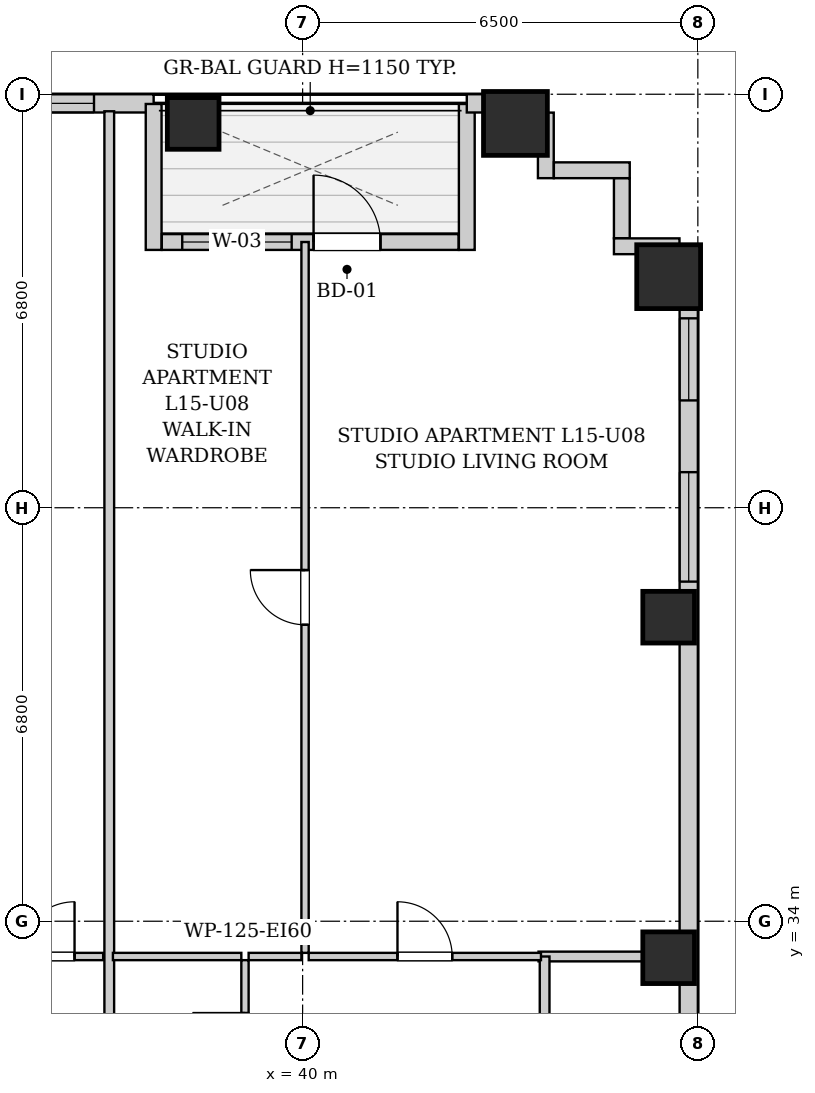
"""IFC4 building model, lengths in metres.
Left out: names, types, materials, properties, quantities, classifications, styles, units other than length and angle.
Written with IfcOpenShell. Run it as: python <this file> out.ifc"""

import sys

from ifc_helpers import new_model, si_unit, direction, frame, frame_2d, origin, origin_2d, place, context, subcontext, project, spatial, rectangle, extrude, element, fill, save


model = new_model("IFC4")
c1 = context("Model", 3, precision=1e-05, world=origin(), true_north=direction((0.0, 1.0)))
c2 = subcontext(c1, "Body", "Model", "MODEL_VIEW")
j1 = project(units=[si_unit("LENGTHUNIT", "METRE"), si_unit("PLANEANGLEUNIT", "RADIAN")], contexts=[c1])
p1 = place(None, origin())
s1 = spatial("IfcSite", under=j1, at=p1, CompositionType="ELEMENT")
p2 = place(p1, origin())
s2 = spatial("IfcBuilding", under=s1, at=p2, CompositionType="ELEMENT")
p3 = place(p2, frame((0.0, 0.0, 57.8)))
s3 = spatial("IfcBuildingStorey", under=s2, at=p3, CompositionType="ELEMENT", Elevation=57.8)
p4 = place(p3, frame((38.2, 47.12, 0.0), z_axis=(0.0, 0.0, 1.0), x_axis=(1.0, 0.0, 0.0)))
e1 = element("IfcColumn", 1, at=p4, inside=s3, PredefinedType="COLUMN", context=c2, shape_type="SweptSolid", body=[
    extrude(rectangle(XDim=0.85, YDim=0.85, at=origin_2d()), origin(), (0.0, 0.0, 1.0), 3.2),
])
p5 = place(p3, frame((43.5, 47.12, 0.0), z_axis=(0.0, 0.0, 1.0), x_axis=(1.0, 0.0, 0.0)))
e2 = element("IfcColumn", 2, at=p5, inside=s3, PredefinedType="COLUMN", context=c2, shape_type="SweptSolid", body=[
    extrude(rectangle(XDim=1.05, YDim=1.05, at=origin_2d()), origin(), (0.0, 0.0, 1.0), 3.2),
])
for number, where, z_axis, x_axis in (
    (3, (46.02, 33.4, 0.0), (0.0, 0.0, 1.0), (1.0, 0.0, 0.0)),
    (4, (46.02, 39.0, 0.0), (0.0, 0.0, 1.0), (1.0, 0.0, 0.0)),
):
    element("IfcColumn", number, at=place(p3, frame(where, z_axis=z_axis, x_axis=x_axis)), inside=s3, PredefinedType="COLUMN", context=c2, shape_type="SweptSolid", body=[
        extrude(rectangle(XDim=0.85, YDim=0.85, at=origin_2d()), origin(), (0.0, 0.0, 1.0), 3.2),
    ])
p6 = place(p3, frame((46.02, 44.6, 0.0), z_axis=(0.0, 0.0, 1.0), x_axis=(1.0, 0.0, 0.0)))
e5 = element("IfcColumn", 5, at=p6, inside=s3, PredefinedType="COLUMN", context=c2, shape_type="SweptSolid", body=[
    extrude(rectangle(XDim=1.05, YDim=1.05, at=origin_2d()), origin(), (0.0, 0.0, 1.0), 3.2),
])
p7 = place(p3, frame((10.0, 47.45, 0.0), z_axis=(0.0, 0.0, 1.0), x_axis=(1.0, 0.0, 0.0)))
e6 = element("IfcWall", 6, at=p7, inside=s3, PredefinedType="SOLIDWALL", context=c2, shape_type="SweptSolid", body=[
    extrude(rectangle(XDim=27.55, YDim=0.3, at=frame_2d((13.775, 0.0))), origin(), (0.0, 0.0, 1.0), 1.975),
])
p8 = place(p7, frame((1.735, 0.0, 0.55)))
e7 = element("IfcOpeningElement", 7, at=p8, cuts=e6, PredefinedType="OPENING", context=c2, shape_type="SweptSolid", body=[
    extrude(rectangle(XDim=1.8, YDim=1.2, at=frame_2d((0.9, 0.6))), frame((0.0, 0.16, 0.0), z_axis=(0.0, -1.0, 0.0), x_axis=(1.0, 0.0, 0.0)), (0.0, 0.0, 1.0), 0.32),
])
p9 = place(p7, frame((5.415, 0.0, 0.55)))
e8 = element("IfcOpeningElement", 8, at=p9, cuts=e6, PredefinedType="OPENING", context=c2, shape_type="SweptSolid", body=[
    extrude(rectangle(XDim=1.8, YDim=1.2, at=frame_2d((0.9, 0.6))), frame((0.0, 0.16, 0.0), z_axis=(0.0, -1.0, 0.0), x_axis=(1.0, 0.0, 0.0)), (0.0, 0.0, 1.0), 0.32),
])
p10 = place(p7, frame((10.617, 0.0, 0.55)))
e9 = element("IfcOpeningElement", 9, at=p10, cuts=e6, PredefinedType="OPENING", context=c2, shape_type="SweptSolid", body=[
    extrude(rectangle(XDim=1.8, YDim=1.2, at=frame_2d((0.9, 0.6))), frame((0.0, 0.16, 0.0), z_axis=(0.0, -1.0, 0.0), x_axis=(1.0, 0.0, 0.0)), (0.0, 0.0, 1.0), 0.32),
])
p11 = place(p7, frame((17.5, 0.0, 0.55)))
e10 = element("IfcOpeningElement", 10, at=p11, cuts=e6, PredefinedType="OPENING", context=c2, shape_type="SweptSolid", body=[
    extrude(rectangle(XDim=0.85, YDim=1.2, at=frame_2d((0.425, 0.6))), frame((0.0, 0.16, 0.0), z_axis=(0.0, -1.0, 0.0), x_axis=(1.0, 0.0, 0.0)), (0.0, 0.0, 1.0), 0.32),
])
p12 = place(p7, frame((19.349, 0.0, 0.55)))
e11 = element("IfcOpeningElement", 11, at=p12, cuts=e6, PredefinedType="OPENING", context=c2, shape_type="SweptSolid", body=[
    extrude(rectangle(XDim=1.8, YDim=1.2, at=frame_2d((0.9, 0.6))), frame((0.0, 0.16, 0.0), z_axis=(0.0, -1.0, 0.0), x_axis=(1.0, 0.0, 0.0)), (0.0, 0.0, 1.0), 0.32),
])
p13 = place(p7, frame((24.769, 0.0, 0.55)))
e12 = element("IfcOpeningElement", 12, at=p13, cuts=e6, PredefinedType="OPENING", context=c2, shape_type="SweptSolid", body=[
    extrude(rectangle(XDim=1.8, YDim=1.2, at=frame_2d((0.9, 0.6))), frame((0.0, 0.16, 0.0), z_axis=(0.0, -1.0, 0.0), x_axis=(1.0, 0.0, 0.0)), (0.0, 0.0, 1.0), 0.32),
])
p14 = place(p3, frame((37.55, 47.44, 0.0), z_axis=(0.0, 0.0, 1.0), x_axis=(0.0, -1.0, 0.0)))
e13 = element("IfcWall", 13, at=p14, inside=s3, PredefinedType="SOLIDWALL", context=c2, shape_type="SweptSolid", body=[
    extrude(rectangle(XDim=2.4, YDim=0.26, at=frame_2d((1.2, 0.0))), origin(), (0.0, 0.0, 1.0), 2.94),
])
p15 = place(p3, frame((37.684, 45.17, 0.0), z_axis=(0.0, 0.0, 1.0), x_axis=(1.0, 0.0, 0.0)))
e14 = element("IfcWall", 14, at=p15, inside=s3, PredefinedType="SOLIDWALL", context=c2, shape_type="SweptSolid", body=[
    extrude(rectangle(XDim=4.882, YDim=0.26, at=frame_2d((2.441, 0.0))), origin(), (0.0, 0.0, 1.0), 2.94),
])
p16 = place(p15, frame((2.496, 0.0, 0.0)))
e15 = element("IfcOpeningElement", 15, at=p16, cuts=e14, PredefinedType="OPENING", context=c2, shape_type="SweptSolid", body=[
    extrude(rectangle(XDim=1.1, YDim=2.0, at=frame_2d((0.55, 1.0))), frame((0.0, 0.14, 0.0), z_axis=(0.0, -1.0, 0.0), x_axis=(1.0, 0.0, 0.0)), (0.0, 0.0, 1.0), 0.28),
])
p17 = place(p15, frame((0.336, 0.0, 0.85)))
e16 = element("IfcOpeningElement", 16, at=p17, cuts=e14, PredefinedType="OPENING", context=c2, shape_type="SweptSolid", body=[
    extrude(rectangle(XDim=1.8, YDim=1.65, at=frame_2d((0.9, 0.825))), frame((0.0, 0.14, 0.0), z_axis=(0.0, -1.0, 0.0), x_axis=(1.0, 0.0, 0.0)), (0.0, 0.0, 1.0), 0.28),
])
p18 = place(p3, frame((42.7, 45.04, 0.0), z_axis=(0.0, 0.0, 1.0), x_axis=(0.0, 1.0, 0.0)))
e17 = element("IfcWall", 17, at=p18, inside=s3, PredefinedType="SOLIDWALL", context=c2, shape_type="SweptSolid", body=[
    extrude(rectangle(XDim=2.4, YDim=0.26, at=frame_2d((1.2, 0.0))), origin(), (0.0, 0.0, 1.0), 2.94),
])
p19 = place(p3, frame((42.7, 47.45, 0.0), z_axis=(0.0, 0.0, 1.0), x_axis=(1.0, 0.0, 0.0)))
e18 = element("IfcWall", 18, at=p19, inside=s3, PredefinedType="SOLIDWALL", context=c2, shape_type="SweptSolid", body=[
    extrude(rectangle(XDim=1.3, YDim=0.3, at=frame_2d((0.65, 0.0))), origin(), (0.0, 0.0, 1.0), 1.975),
])
p20 = place(p3, frame((46.35, 45.1, 0.0), z_axis=(0.0, 0.0, 1.0), x_axis=(0.0, -1.0, 0.0)))
e19 = element("IfcWall", 19, at=p20, inside=s3, PredefinedType="SOLIDWALL", context=c2, shape_type="SweptSolid", body=[
    extrude(rectangle(XDim=42.6, YDim=0.3, at=frame_2d((21.3, 0.0))), origin(), (0.0, 0.0, 1.0), 1.975),
])
p21 = place(p20, frame((37.575, 0.0, 0.55)))
e20 = element("IfcOpeningElement", 20, at=p21, cuts=e19, PredefinedType="OPENING", context=c2, shape_type="SweptSolid", body=[
    extrude(rectangle(XDim=1.8, YDim=1.2, at=frame_2d((0.9, 0.6))), frame((0.0, 0.16, 0.0), z_axis=(0.0, -1.0, 0.0), x_axis=(1.0, 0.0, 0.0)), (0.0, 0.0, 1.0), 0.32),
])
p22 = place(p20, frame((34.85, 0.0, 0.55)))
e21 = element("IfcOpeningElement", 21, at=p22, cuts=e19, PredefinedType="OPENING", context=c2, shape_type="SweptSolid", body=[
    extrude(rectangle(XDim=1.35, YDim=1.2, at=frame_2d((0.675, 0.6))), frame((0.0, 0.16, 0.0), z_axis=(0.0, -1.0, 0.0), x_axis=(1.0, 0.0, 0.0)), (0.0, 0.0, 1.0), 0.32),
])
p23 = place(p20, frame((3.715, 0.0, 0.55)))
e22 = element("IfcOpeningElement", 22, at=p23, cuts=e19, PredefinedType="OPENING", context=c2, shape_type="SweptSolid", body=[
    extrude(rectangle(XDim=1.8, YDim=1.2, at=frame_2d((0.9, 0.6))), frame((0.0, 0.16, 0.0), z_axis=(0.0, -1.0, 0.0), x_axis=(1.0, 0.0, 0.0)), (0.0, 0.0, 1.0), 0.32),
])
p24 = place(p20, frame((1.185, 0.0, 0.55)))
e23 = element("IfcOpeningElement", 23, at=p24, cuts=e19, PredefinedType="OPENING", context=c2, shape_type="SweptSolid", body=[
    extrude(rectangle(XDim=1.35, YDim=1.2, at=frame_2d((0.675, 0.6))), frame((0.0, 0.16, 0.0), z_axis=(0.0, -1.0, 0.0), x_axis=(1.0, 0.0, 0.0)), (0.0, 0.0, 1.0), 0.32),
])
p25 = place(p20, frame((26.025, 0.0, 0.55)))
e24 = element("IfcOpeningElement", 24, at=p25, cuts=e19, PredefinedType="OPENING", context=c2, shape_type="SweptSolid", body=[
    extrude(rectangle(XDim=1.8, YDim=1.2, at=frame_2d((0.9, 0.6))), frame((0.0, 0.16, 0.0), z_axis=(0.0, -1.0, 0.0), x_axis=(1.0, 0.0, 0.0)), (0.0, 0.0, 1.0), 0.32),
])
p26 = place(p20, frame((28.085, 0.0, 0.55)))
e25 = element("IfcOpeningElement", 25, at=p26, cuts=e19, PredefinedType="OPENING", context=c2, shape_type="SweptSolid", body=[
    extrude(rectangle(XDim=1.35, YDim=1.2, at=frame_2d((0.675, 0.6))), frame((0.0, 0.16, 0.0), z_axis=(0.0, -1.0, 0.0), x_axis=(1.0, 0.0, 0.0)), (0.0, 0.0, 1.0), 0.32),
])
p27 = place(p20, frame((18.8, 0.0, 0.55)))
e26 = element("IfcOpeningElement", 26, at=p27, cuts=e19, PredefinedType="OPENING", context=c2, shape_type="SweptSolid", body=[
    extrude(rectangle(XDim=1.8, YDim=1.2, at=frame_2d((0.9, 0.6))), frame((0.0, 0.16, 0.0), z_axis=(0.0, -1.0, 0.0), x_axis=(1.0, 0.0, 0.0)), (0.0, 0.0, 1.0), 0.32),
])
p28 = place(p20, frame((16.685, 0.0, 0.55)))
e27 = element("IfcOpeningElement", 27, at=p28, cuts=e19, PredefinedType="OPENING", context=c2, shape_type="SweptSolid", body=[
    extrude(rectangle(XDim=1.35, YDim=1.2, at=frame_2d((0.675, 0.6))), frame((0.0, 0.16, 0.0), z_axis=(0.0, -1.0, 0.0), x_axis=(1.0, 0.0, 0.0)), (0.0, 0.0, 1.0), 0.32),
])
p29 = place(p3, frame((44.0, 47.298, 0.0), z_axis=(0.0, 0.0, 1.0), x_axis=(0.0, -1.0, 0.0)))
e28 = element("IfcWall", 28, at=p29, inside=s3, PredefinedType="SOLIDWALL", context=c2, shape_type="SweptSolid", body=[
    extrude(rectangle(XDim=1.078, YDim=0.26, at=frame_2d((0.539, 0.0))), origin(), (0.0, 0.0, 1.0), 2.94),
])
p30 = place(p3, frame((44.132, 46.35, 0.0), z_axis=(0.0, 0.0, 1.0), x_axis=(1.0, 0.0, 0.0)))
e29 = element("IfcWall", 29, at=p30, inside=s3, PredefinedType="SOLIDWALL", context=c2, shape_type="SweptSolid", body=[
    extrude(rectangle(XDim=1.248, YDim=0.26, at=frame_2d((0.624, 0.0))), origin(), (0.0, 0.0, 1.0), 2.94),
])
p31 = place(p3, frame((45.25, 46.218, 0.0), z_axis=(0.0, 0.0, 1.0), x_axis=(0.0, -1.0, 0.0)))
e30 = element("IfcWall", 30, at=p31, inside=s3, PredefinedType="SOLIDWALL", context=c2, shape_type="SweptSolid", body=[
    extrude(rectangle(XDim=0.986, YDim=0.26, at=frame_2d((0.493, 0.0))), origin(), (0.0, 0.0, 1.0), 2.94),
])
p32 = place(p3, frame((45.12, 45.1, 0.0), z_axis=(0.0, 0.0, 1.0), x_axis=(1.0, 0.0, 0.0)))
e31 = element("IfcWall", 31, at=p32, inside=s3, PredefinedType="SOLIDWALL", context=c2, shape_type="SweptSolid", body=[
    extrude(rectangle(XDim=1.078, YDim=0.26, at=frame_2d((0.539, 0.0))), origin(), (0.0, 0.0, 1.0), 2.94),
])
p33 = place(p3, frame((34.879, 33.42, 0.0), z_axis=(0.0, 0.0, 1.0), x_axis=(1.0, 0.0, 0.0)))
e32 = element("IfcWall", 32, at=p33, inside=s3, PredefinedType="PARTITIONING", context=c2, shape_type="SweptSolid", body=[
    extrude(rectangle(XDim=1.841, YDim=0.12, at=frame_2d((0.92, 0.0))), origin(), (0.0, 0.0, 1.0), 2.94),
])
p34 = place(p33, frame((0.47, 0.0, 0.0)))
e33 = element("IfcOpeningElement", 33, at=p34, cuts=e32, PredefinedType="OPENING", context=c2, shape_type="SweptSolid", body=[
    extrude(rectangle(XDim=0.9, YDim=2.05, at=frame_2d((0.45, 1.025))), frame((0.0, 0.07, 0.0), z_axis=(0.0, -1.0, 0.0), x_axis=(1.0, 0.0, 0.0)), (0.0, 0.0, 1.0), 0.14),
])
p35 = place(p3, frame((43.88, 33.42, 0.0), z_axis=(0.0, 0.0, 1.0), x_axis=(1.0, 0.0, 0.0)))
e34 = element("IfcWall", 34, at=p35, inside=s3, PredefinedType="PARTITIONING", context=c2, shape_type="SweptSolid", body=[
    extrude(rectangle(XDim=2.34, YDim=0.16, at=frame_2d((1.17, 0.0))), origin(), (0.0, 0.0, 1.0), 2.94),
])
p36 = place(p3, frame((43.98, 30.76, 0.0), z_axis=(0.0, 0.0, 1.0), x_axis=(0.0, 1.0, 0.0)))
e35 = element("IfcWall", 35, at=p36, inside=s3, PredefinedType="PARTITIONING", context=c2, shape_type="SweptSolid", body=[
    extrude(rectangle(XDim=2.66, YDim=0.16, at=frame_2d((1.33, 0.0))), origin(), (0.0, 0.0, 1.0), 2.94),
])
p37 = place(p3, frame((36.82, 30.76, 0.0), z_axis=(0.0, 0.0, 1.0), x_axis=(0.0, 1.0, 0.0)))
e36 = element("IfcWall", 36, at=p37, inside=s3, PredefinedType="PARTITIONING", context=c2, shape_type="SweptSolid", body=[
    extrude(rectangle(XDim=16.56, YDim=0.16, at=frame_2d((8.28, 0.0))), origin(), (0.0, 0.0, 1.0), 2.94),
])
p38 = place(p3, frame((39.052, 30.76, 0.0), z_axis=(0.0, 0.0, 1.0), x_axis=(0.0, 1.0, 0.0)))
e37 = element("IfcWall", 37, at=p38, inside=s3, PredefinedType="PARTITIONING", context=c2, shape_type="SweptSolid", body=[
    extrude(rectangle(XDim=2.6, YDim=0.12, at=frame_2d((1.3, 0.0))), origin(), (0.0, 0.0, 1.0), 2.94),
])
p39 = place(p38, frame((0.87, 0.0, 0.0)))
e38 = element("IfcOpeningElement", 38, at=p39, cuts=e37, PredefinedType="OPENING", context=c2, shape_type="SweptSolid", body=[
    extrude(rectangle(XDim=0.86, YDim=2.05, at=frame_2d((0.43, 1.025))), frame((0.0, 0.07, 0.0), z_axis=(0.0, -1.0, 0.0), x_axis=(1.0, 0.0, 0.0)), (0.0, 0.0, 1.0), 0.14),
])
p40 = place(p3, frame((36.88, 33.42, 0.0), z_axis=(0.0, 0.0, 1.0), x_axis=(1.0, 0.0, 0.0)))
e39 = element("IfcWall", 39, at=p40, inside=s3, PredefinedType="PARTITIONING", context=c2, shape_type="SweptSolid", body=[
    extrude(rectangle(XDim=2.112, YDim=0.12, at=frame_2d((1.056, 0.0))), origin(), (0.0, 0.0, 1.0), 2.94),
])
p41 = place(p3, frame((39.112, 33.42, 0.0), z_axis=(0.0, 0.0, 1.0), x_axis=(1.0, 0.0, 0.0)))
e40 = element("IfcWall", 40, at=p41, inside=s3, PredefinedType="PARTITIONING", context=c2, shape_type="SweptSolid", body=[
    extrude(rectangle(XDim=0.868, YDim=0.12, at=frame_2d((0.434, 0.0))), origin(), (0.0, 0.0, 1.0), 2.94),
])
p42 = place(p3, frame((40.1, 33.42, 0.0), z_axis=(0.0, 0.0, 1.0), x_axis=(1.0, 0.0, 0.0)))
e41 = element("IfcWall", 41, at=p42, inside=s3, PredefinedType="PARTITIONING", context=c2, shape_type="SweptSolid", body=[
    extrude(rectangle(XDim=3.82, YDim=0.12, at=frame_2d((1.91, 0.0))), origin(), (0.0, 0.0, 1.0), 2.94),
])
p43 = place(p42, frame((1.46, 0.0, 0.0)))
e42 = element("IfcOpeningElement", 42, at=p43, cuts=e41, PredefinedType="OPENING", context=c2, shape_type="SweptSolid", body=[
    extrude(rectangle(XDim=0.9, YDim=2.05, at=frame_2d((0.45, 1.025))), frame((0.0, 0.07, 0.0), z_axis=(0.0, -1.0, 0.0), x_axis=(1.0, 0.0, 0.0)), (0.0, 0.0, 1.0), 0.14),
])
p44 = place(p3, frame((40.04, 33.48, 0.0), z_axis=(0.0, 0.0, 1.0), x_axis=(0.0, 1.0, 0.0)))
e43 = element("IfcWall", 43, at=p44, inside=s3, PredefinedType="PARTITIONING", context=c2, shape_type="SweptSolid", body=[
    extrude(rectangle(XDim=11.69, YDim=0.12, at=frame_2d((5.845, 0.0))), origin(), (0.0, 0.0, 1.0), 2.94),
])
p45 = place(p44, frame((5.395, 0.0, 0.0)))
e44 = element("IfcOpeningElement", 44, at=p45, cuts=e43, PredefinedType="OPENING", context=c2, shape_type="SweptSolid", body=[
    extrude(rectangle(XDim=0.9, YDim=2.05, at=frame_2d((0.45, 1.025))), frame((0.0, 0.07, 0.0), z_axis=(0.0, -1.0, 0.0), x_axis=(1.0, 0.0, 0.0)), (0.0, 0.0, 1.0), 0.14),
])
p46 = place(p34, origin())
e45 = element("IfcDoor", 45, at=p46, inside=s3, OperationType="SINGLE_SWING_RIGHT", PredefinedType="DOOR", context=c2, shape_type="SweptSolid", body=[
    extrude(rectangle(XDim=0.9, YDim=2.05, at=frame_2d((0.45, 1.025))), frame((0.0, 0.025, 0.0), z_axis=(0.0, -1.0, 0.0), x_axis=(1.0, 0.0, 0.0)), (0.0, 0.0, 1.0), 0.05),
])
fill(e33, e45)
p47 = place(p39, origin())
e46 = element("IfcDoor", 46, at=p47, inside=s3, OperationType="SINGLE_SWING_RIGHT", PredefinedType="DOOR", context=c2, shape_type="SweptSolid", body=[
    extrude(rectangle(XDim=0.86, YDim=2.05, at=frame_2d((0.43, 1.025))), frame((0.0, 0.025, 0.0), z_axis=(0.0, -1.0, 0.0), x_axis=(1.0, 0.0, 0.0)), (0.0, 0.0, 1.0), 0.05),
])
fill(e38, e46)
p48 = place(p43, origin())
e47 = element("IfcDoor", 47, at=p48, inside=s3, OperationType="SINGLE_SWING_LEFT", PredefinedType="DOOR", context=c2, shape_type="SweptSolid", body=[
    extrude(rectangle(XDim=0.9, YDim=2.05, at=frame_2d((0.45, 1.025))), frame((0.0, 0.025, 0.0), z_axis=(0.0, -1.0, 0.0), x_axis=(1.0, 0.0, 0.0)), (0.0, 0.0, 1.0), 0.05),
])
fill(e42, e47)
p49 = place(p45, origin())
e48 = element("IfcDoor", 48, at=p49, inside=s3, OperationType="SINGLE_SWING_RIGHT", PredefinedType="DOOR", context=c2, shape_type="SweptSolid", body=[
    extrude(rectangle(XDim=0.9, YDim=2.05, at=frame_2d((0.45, 1.025))), frame((0.0, 0.025, 0.0), z_axis=(0.0, -1.0, 0.0), x_axis=(1.0, 0.0, 0.0)), (0.0, 0.0, 1.0), 0.05),
])
fill(e44, e48)
p50 = place(p16, origin())
e49 = element("IfcDoor", 49, at=p50, inside=s3, OperationType="SINGLE_SWING_LEFT", PredefinedType="DOOR", context=c2, shape_type="SweptSolid", body=[
    extrude(rectangle(XDim=1.1, YDim=2.0, at=frame_2d((0.55, 1.0))), frame((0.0, 0.025, 0.0), z_axis=(0.0, -1.0, 0.0), x_axis=(1.0, 0.0, 0.0)), (0.0, 0.0, 1.0), 0.05),
])
fill(e15, e49)
p51 = place(p13, origin())
e50 = element("IfcWindow", 50, at=p51, inside=s3, PartitioningType="DOUBLE_PANEL_VERTICAL", PredefinedType="WINDOW", context=c2, shape_type="SweptSolid", body=[
    extrude(rectangle(XDim=1.8, YDim=1.2, at=frame_2d((0.9, 0.6))), frame((0.0, 0.03, 0.0), z_axis=(0.0, -1.0, 0.0), x_axis=(1.0, 0.0, 0.0)), (0.0, 0.0, 1.0), 0.06),
])
fill(e12, e50)
p52 = place(p17, origin())
e51 = element("IfcWindow", 51, at=p52, inside=s3, PartitioningType="DOUBLE_PANEL_VERTICAL", PredefinedType="WINDOW", context=c2, shape_type="SweptSolid", body=[
    extrude(rectangle(XDim=1.8, YDim=1.65, at=frame_2d((0.9, 0.825))), frame((0.0, 0.03, 0.0), z_axis=(0.0, -1.0, 0.0), x_axis=(1.0, 0.0, 0.0)), (0.0, 0.0, 1.0), 0.06),
])
fill(e16, e51)
p53 = place(p23, origin())
e52 = element("IfcWindow", 52, at=p53, inside=s3, PartitioningType="DOUBLE_PANEL_VERTICAL", PredefinedType="WINDOW", context=c2, shape_type="SweptSolid", body=[
    extrude(rectangle(XDim=1.8, YDim=1.2, at=frame_2d((0.9, 0.6))), frame((0.0, 0.03, 0.0), z_axis=(0.0, -1.0, 0.0), x_axis=(1.0, 0.0, 0.0)), (0.0, 0.0, 1.0), 0.06),
])
fill(e22, e52)
p54 = place(p24, origin())
e53 = element("IfcWindow", 53, at=p54, inside=s3, PartitioningType="SINGLE_PANEL", PredefinedType="WINDOW", context=c2, shape_type="SweptSolid", body=[
    extrude(rectangle(XDim=1.35, YDim=1.2, at=frame_2d((0.675, 0.6))), frame((0.0, 0.03, 0.0), z_axis=(0.0, -1.0, 0.0), x_axis=(1.0, 0.0, 0.0)), (0.0, 0.0, 1.0), 0.06),
])
fill(e23, e53)
save(model, sys.argv[1])
